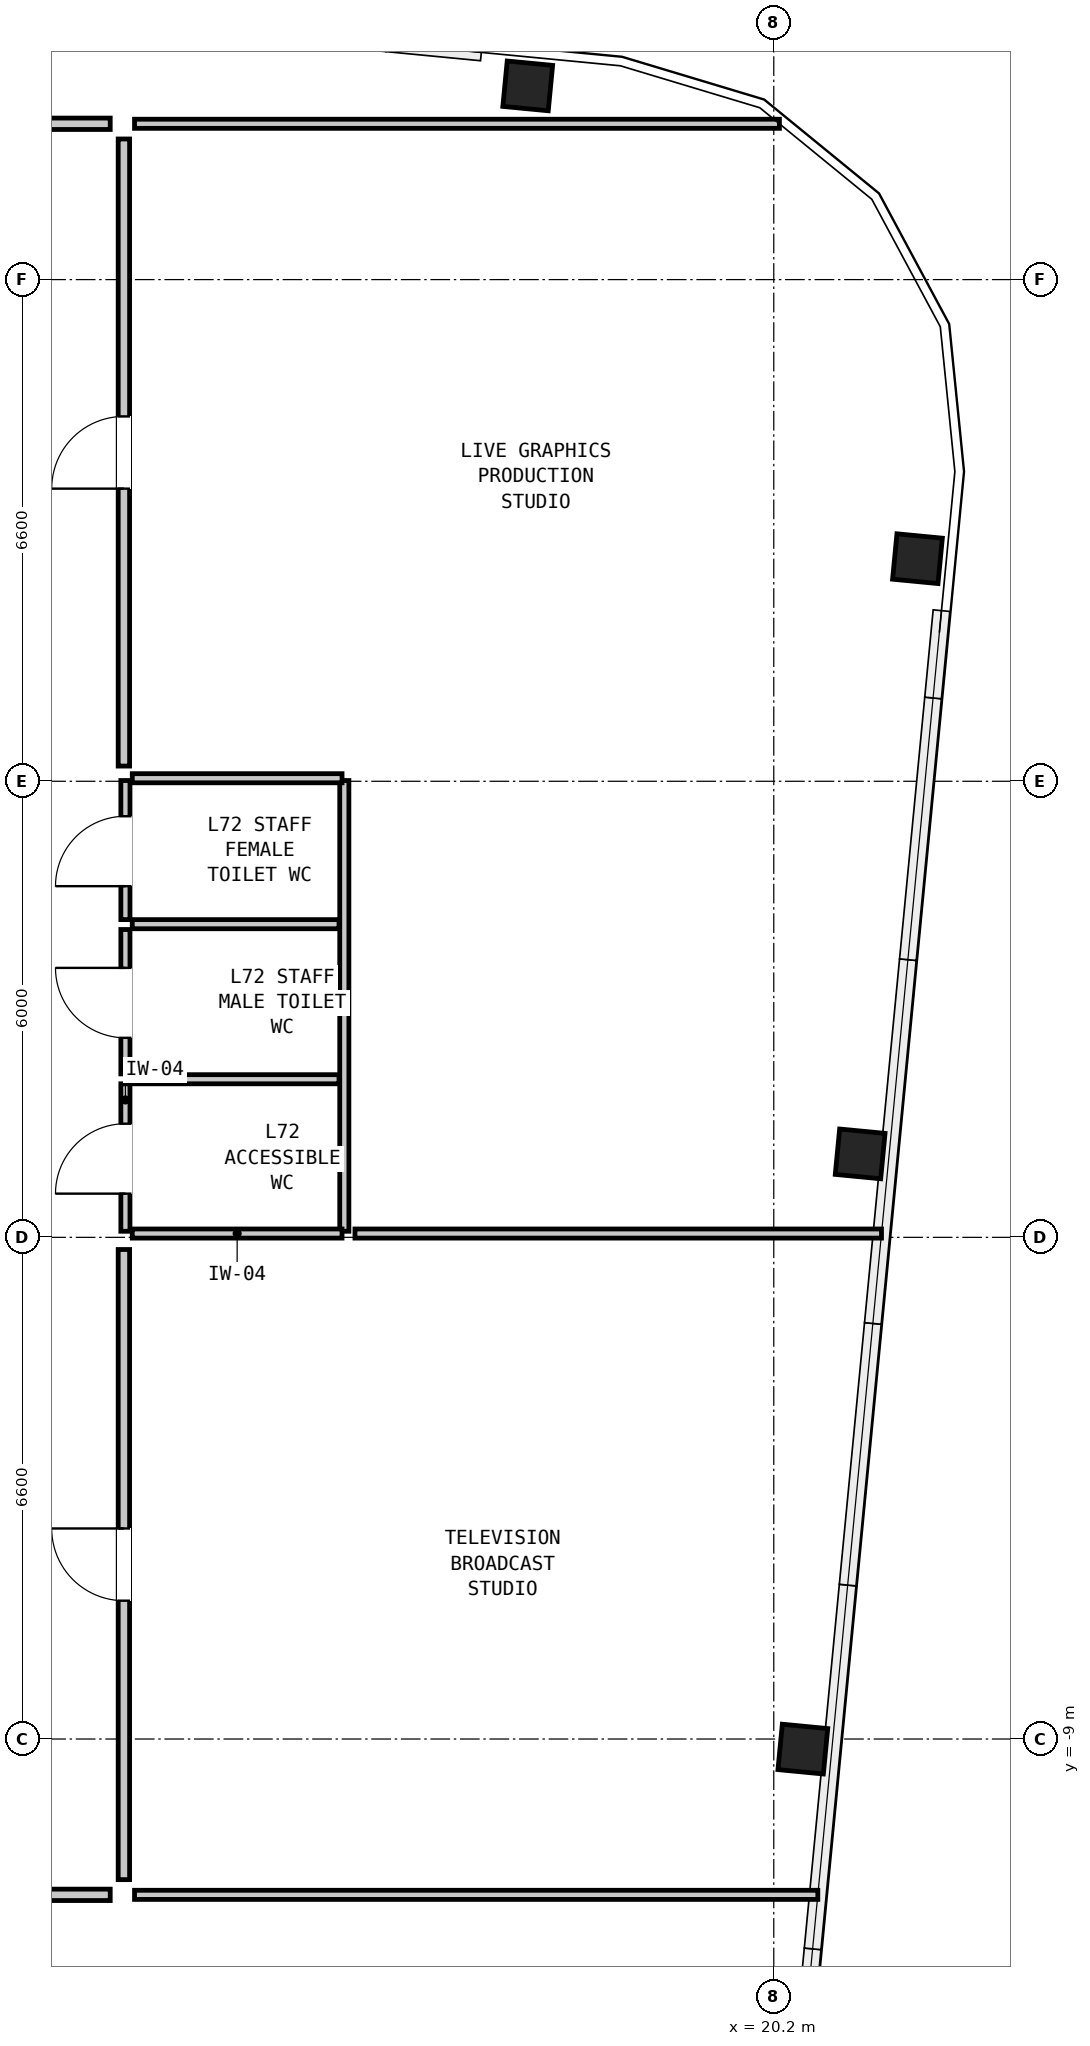
"""IFC4 building model, lengths in metres.
Left out: names, types, materials, properties, quantities, classifications, styles, units other than length and angle.
Written with IfcOpenShell. Run it as: python <this file> out.ifc"""

import sys

from ifc_helpers import new_model, si_unit, direction, frame, frame_2d, origin, origin_2d, place, context, subcontext, project, spatial, rectangle, hollow_rectangle, extrude, element, fill, save


model = new_model("IFC4")
c1 = context("Model", 3, precision=1e-05, world=origin(), true_north=direction((0.0, 1.0)))
c2 = subcontext(c1, "Body", "Model", "MODEL_VIEW")
j1 = project(units=[si_unit("LENGTHUNIT", "METRE"), si_unit("PLANEANGLEUNIT", "RADIAN")], contexts=[c1])
p1 = place(None, origin())
s1 = spatial("IfcSite", under=j1, at=p1, CompositionType="ELEMENT")
p2 = place(p1, origin())
s2 = spatial("IfcBuilding", under=s1, at=p2, CompositionType="ELEMENT")
p3 = place(p2, frame((0.0, 0.0, 245.9)))
s3 = spatial("IfcBuildingStorey", under=s2, at=p3, CompositionType="ELEMENT", Elevation=245.9)
for number, where, z_axis, x_axis in (
    (1, (20.583, -9.133, 0.0), (0.0, 0.0, 1.0), (0.096, 0.995, 0.0)),
    (2, (21.336, -1.302, 0.0), (0.0, 0.0, 1.0), (0.096, 0.995, 0.0)),
    (3, (22.09, 6.528, 0.0), (0.0, 0.0, 1.0), (0.096, 0.995, 0.0)),
    (4, (16.963, 12.749, 0.0), (0.0, 0.0, 1.0), (0.995, -0.096, 0.0)),
):
    element("IfcColumn", number, at=place(p3, frame(where, z_axis=z_axis, x_axis=x_axis)), inside=s3, PredefinedType="COLUMN", context=c2, shape_type="SweptSolid", body=[
        extrude(hollow_rectangle(XDim=0.6, YDim=0.6, WallThickness=0.04, at=origin_2d()), origin(), (0.0, 0.0, 1.0), 3.05),
    ])
p4 = place(p3, frame((11.67, -2.32, 0.0), z_axis=(0.0, 0.0, 1.0), x_axis=(0.0, 1.0, 0.0)))
e5 = element("IfcWall", 5, at=p4, inside=s3, PredefinedType="PARTITIONING", context=c2, shape_type="SweptSolid", body=[
    extrude(rectangle(XDim=1.94, YDim=0.12, at=frame_2d((0.97, 0.0))), origin(), (0.0, 0.0, 1.0), 2.86),
])
p5 = place(p4, frame((0.495, 0.0, 0.0)))
e6 = element("IfcOpeningElement", 6, at=p5, cuts=e5, PredefinedType="OPENING", context=c2, shape_type="SweptSolid", body=[
    extrude(rectangle(XDim=0.92, YDim=2.1, at=frame_2d((0.46, 1.05))), frame((0.0, 0.072, 0.0), z_axis=(0.0, -1.0, 0.0), x_axis=(1.0, 0.0, 0.0)), (0.0, 0.0, 1.0), 0.144),
])
p6 = place(p3, frame((11.67, -0.25, 0.0), z_axis=(0.0, 0.0, 1.0), x_axis=(0.0, 1.0, 0.0)))
e7 = element("IfcWall", 7, at=p6, inside=s3, PredefinedType="PARTITIONING", context=c2, shape_type="SweptSolid", body=[
    extrude(rectangle(XDim=1.9, YDim=0.12, at=frame_2d((0.95, 0.0))), origin(), (0.0, 0.0, 1.0), 2.86),
])
p7 = place(p6, frame((0.475, 0.0, 0.0)))
e8 = element("IfcOpeningElement", 8, at=p7, cuts=e7, PredefinedType="OPENING", context=c2, shape_type="SweptSolid", body=[
    extrude(rectangle(XDim=0.92, YDim=2.1, at=frame_2d((0.46, 1.05))), frame((0.0, 0.072, 0.0), z_axis=(0.0, -1.0, 0.0), x_axis=(1.0, 0.0, 0.0)), (0.0, 0.0, 1.0), 0.144),
])
p8 = place(p3, frame((11.67, 1.78, 0.0), z_axis=(0.0, 0.0, 1.0), x_axis=(0.0, 1.0, 0.0)))
e9 = element("IfcWall", 9, at=p8, inside=s3, PredefinedType="PARTITIONING", context=c2, shape_type="SweptSolid", body=[
    extrude(rectangle(XDim=1.83, YDim=0.12, at=frame_2d((0.915, 0.0))), origin(), (0.0, 0.0, 1.0), 2.86),
])
p9 = place(p8, frame((0.44, 0.0, 0.0)))
e10 = element("IfcOpeningElement", 10, at=p9, cuts=e9, PredefinedType="OPENING", context=c2, shape_type="SweptSolid", body=[
    extrude(rectangle(XDim=0.92, YDim=2.1, at=frame_2d((0.46, 1.05))), frame((0.0, 0.072, 0.0), z_axis=(0.0, -1.0, 0.0), x_axis=(1.0, 0.0, 0.0)), (0.0, 0.0, 1.0), 0.144),
])
p10 = place(p3, frame((14.55, -2.32, 0.0), z_axis=(0.0, 0.0, 1.0), x_axis=(0.0, 1.0, 0.0)))
e11 = element("IfcWall", 11, at=p10, inside=s3, PredefinedType="PARTITIONING", context=c2, shape_type="SweptSolid", body=[
    extrude(rectangle(XDim=5.93, YDim=0.12, at=frame_2d((2.965, 0.0))), origin(), (0.0, 0.0, 1.0), 2.86),
])
for number, where, z_axis, x_axis in (
    (12, (11.76, -2.35, 0.0), (0.0, 0.0, 1.0), (1.0, 0.0, 0.0)),
    (13, (11.76, 3.64, 0.0), (0.0, 0.0, 1.0), (1.0, 0.0, 0.0)),
):
    element("IfcWall", number, at=place(p3, frame(where, z_axis=z_axis, x_axis=x_axis)), inside=s3, PredefinedType="PARTITIONING", context=c2, shape_type="SweptSolid", body=[
        extrude(rectangle(XDim=2.76, YDim=0.12, at=frame_2d((1.38, 0.0))), origin(), (0.0, 0.0, 1.0), 1.981),
    ])
for number, where, z_axis, x_axis in (
    (14, (11.76, -0.32, 0.0), (0.0, 0.0, 1.0), (1.0, 0.0, 0.0)),
    (15, (11.76, 1.72, 0.0), (0.0, 0.0, 1.0), (1.0, 0.0, 0.0)),
):
    element("IfcWall", number, at=place(p3, frame(where, z_axis=z_axis, x_axis=x_axis)), inside=s3, PredefinedType="PARTITIONING", context=c2, shape_type="SweptSolid", body=[
        extrude(rectangle(XDim=2.72, YDim=0.12, at=frame_2d((1.36, 0.0))), origin(), (0.0, 0.0, 1.0), 2.86),
    ])
p11 = place(p3, frame((11.79, 12.25, 0.0), z_axis=(0.0, 0.0, 1.0), x_axis=(1.0, 0.0, 0.0)))
e16 = element("IfcWall", 16, at=p11, inside=s3, PredefinedType="PARTITIONING", context=c2, shape_type="SweptSolid", body=[
    extrude(rectangle(XDim=8.484, YDim=0.12, at=frame_2d((4.242, 0.0))), origin(), (0.0, 0.0, 1.0), 2.86),
])
p12 = place(p3, frame((11.79, -11.05, 0.0), z_axis=(0.0, 0.0, 1.0), x_axis=(1.0, 0.0, 0.0)))
e17 = element("IfcWall", 17, at=p12, inside=s3, PredefinedType="PARTITIONING", context=c2, shape_type="SweptSolid", body=[
    extrude(rectangle(XDim=8.99, YDim=0.12, at=frame_2d((4.495, 0.0))), origin(), (0.0, 0.0, 1.0), 2.86),
])
p13 = place(p3, frame((14.69, -2.35, 0.0), z_axis=(0.0, 0.0, 1.0), x_axis=(1.0, 0.0, 0.0)))
e18 = element("IfcWall", 18, at=p13, inside=s3, PredefinedType="PARTITIONING", context=c2, shape_type="SweptSolid", body=[
    extrude(rectangle(XDim=6.927, YDim=0.12, at=frame_2d((3.464, 0.0))), origin(), (0.0, 0.0, 1.0), 1.981),
])
p14 = place(p3, frame((-0.32, 12.25, 0.0), z_axis=(0.0, 0.0, 1.0), x_axis=(1.0, 0.0, 0.0)))
e19 = element("IfcWall", 19, at=p14, inside=s3, PredefinedType="PARTITIONING", context=c2, shape_type="SweptSolid", body=[
    extrude(rectangle(XDim=11.79, YDim=0.15, at=frame_2d((5.895, 0.0))), origin(), (0.0, 0.0, 1.0), 2.86),
])
p15 = place(p14, frame((5.42, 0.0, 0.0)))
e20 = element("IfcOpeningElement", 20, at=p15, cuts=e19, PredefinedType="OPENING", context=c2, shape_type="SweptSolid", body=[
    extrude(rectangle(XDim=0.95, YDim=2.1, at=frame_2d((0.475, 1.05))), frame((0.0, 0.087, 0.0), z_axis=(0.0, -1.0, 0.0), x_axis=(1.0, 0.0, 0.0)), (0.0, 0.0, 1.0), 0.174),
])
p16 = place(p3, frame((-11.12, -11.05, 0.0), z_axis=(0.0, 0.0, 1.0), x_axis=(1.0, 0.0, 0.0)))
e21 = element("IfcWall", 21, at=p16, inside=s3, PredefinedType="PARTITIONING", context=c2, shape_type="SweptSolid", body=[
    extrude(rectangle(XDim=22.59, YDim=0.15, at=frame_2d((11.295, 0.0))), origin(), (0.0, 0.0, 1.0), 2.86),
])
p17 = place(p16, frame((10.82, 0.0, 0.0)))
e22 = element("IfcOpeningElement", 22, at=p17, cuts=e21, PredefinedType="OPENING", context=c2, shape_type="SweptSolid", body=[
    extrude(rectangle(XDim=0.95, YDim=2.1, at=frame_2d((0.475, 1.05))), frame((0.0, 0.087, 0.0), z_axis=(0.0, -1.0, 0.0), x_axis=(1.0, 0.0, 0.0)), (0.0, 0.0, 1.0), 0.174),
])
p18 = place(p3, frame((11.65, -10.85, 0.0), z_axis=(0.0, 0.0, 1.0), x_axis=(0.0, 1.0, 0.0)))
e23 = element("IfcWall", 23, at=p18, inside=s3, PredefinedType="PARTITIONING", context=c2, shape_type="SweptSolid", body=[
    extrude(rectangle(XDim=8.29, YDim=0.15, at=frame_2d((4.145, 0.0))), origin(), (0.0, 0.0, 1.0), 2.86),
])
p19 = place(p18, frame((3.67, 0.0, 0.0)))
e24 = element("IfcOpeningElement", 24, at=p19, cuts=e23, PredefinedType="OPENING", context=c2, shape_type="SweptSolid", body=[
    extrude(rectangle(XDim=0.95, YDim=2.1, at=frame_2d((0.475, 1.05))), frame((0.0, 0.087, 0.0), z_axis=(0.0, -1.0, 0.0), x_axis=(1.0, 0.0, 0.0)), (0.0, 0.0, 1.0), 0.174),
])
p20 = place(p3, frame((11.65, 3.8, 0.0), z_axis=(0.0, 0.0, 1.0), x_axis=(0.0, 1.0, 0.0)))
e25 = element("IfcWall", 25, at=p20, inside=s3, PredefinedType="PARTITIONING", context=c2, shape_type="SweptSolid", body=[
    extrude(rectangle(XDim=8.25, YDim=0.15, at=frame_2d((4.125, 0.0))), origin(), (0.0, 0.0, 1.0), 2.86),
])
p21 = place(p20, frame((3.65, 0.0, 0.0)))
e26 = element("IfcOpeningElement", 26, at=p21, cuts=e25, PredefinedType="OPENING", context=c2, shape_type="SweptSolid", body=[
    extrude(rectangle(XDim=0.95, YDim=2.1, at=frame_2d((0.475, 1.05))), frame((0.0, 0.087, 0.0), z_axis=(0.0, -1.0, 0.0), x_axis=(1.0, 0.0, 0.0)), (0.0, 0.0, 1.0), 0.174),
])
p22 = place(p5, origin())
e27 = element("IfcDoor", 27, at=p22, inside=s3, OperationType="SINGLE_SWING_LEFT", PredefinedType="DOOR", context=c2, shape_type="SweptSolid", body=[
    extrude(rectangle(XDim=0.92, YDim=2.1, at=frame_2d((0.46, 1.05))), frame((0.0, 0.025, 0.0), z_axis=(0.0, -1.0, 0.0), x_axis=(1.0, 0.0, 0.0)), (0.0, 0.0, 1.0), 0.05),
])
fill(e6, e27)
p23 = place(p7, origin())
e28 = element("IfcDoor", 28, at=p23, inside=s3, OperationType="SINGLE_SWING_RIGHT", PredefinedType="DOOR", context=c2, shape_type="SweptSolid", body=[
    extrude(rectangle(XDim=0.92, YDim=2.1, at=frame_2d((0.46, 1.05))), frame((0.0, 0.025, 0.0), z_axis=(0.0, -1.0, 0.0), x_axis=(1.0, 0.0, 0.0)), (0.0, 0.0, 1.0), 0.05),
])
fill(e8, e28)
p24 = place(p9, origin())
e29 = element("IfcDoor", 29, at=p24, inside=s3, OperationType="SINGLE_SWING_LEFT", PredefinedType="DOOR", context=c2, shape_type="SweptSolid", body=[
    extrude(rectangle(XDim=0.92, YDim=2.1, at=frame_2d((0.46, 1.05))), frame((0.0, 0.025, 0.0), z_axis=(0.0, -1.0, 0.0), x_axis=(1.0, 0.0, 0.0)), (0.0, 0.0, 1.0), 0.05),
])
fill(e10, e29)
p25 = place(p19, origin())
e30 = element("IfcDoor", 30, at=p25, inside=s3, OperationType="SINGLE_SWING_RIGHT", PredefinedType="DOOR", context=c2, shape_type="SweptSolid", body=[
    extrude(rectangle(XDim=0.95, YDim=2.1, at=frame_2d((0.475, 1.05))), frame((0.0, 0.025, 0.0), z_axis=(0.0, -1.0, 0.0), x_axis=(1.0, 0.0, 0.0)), (0.0, 0.0, 1.0), 0.05),
])
fill(e24, e30)
p26 = place(p21, origin())
e31 = element("IfcDoor", 31, at=p26, inside=s3, OperationType="SINGLE_SWING_LEFT", PredefinedType="DOOR", context=c2, shape_type="SweptSolid", body=[
    extrude(rectangle(XDim=0.95, YDim=2.1, at=frame_2d((0.475, 1.05))), frame((0.0, 0.025, 0.0), z_axis=(0.0, -1.0, 0.0), x_axis=(1.0, 0.0, 0.0)), (0.0, 0.0, 1.0), 0.05),
])
fill(e26, e31)
save(model, sys.argv[1])
